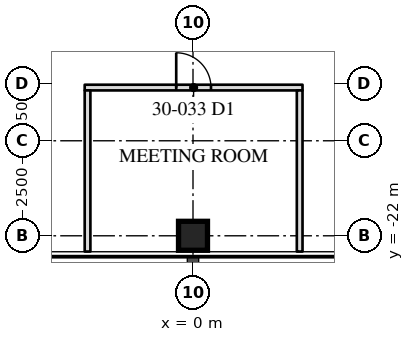
"""IFC4 building model, lengths in metres.
Left out: names, types, materials, properties, quantities, classifications, styles, units other than length and angle.
Written with IfcOpenShell. Run it as: python <this file> out.ifc"""

import sys

from ifc_helpers import new_model, si_unit, direction, frame, frame_2d, origin, origin_2d, place, context, subcontext, project, spatial, rectangle, hollow_rectangle, extrude, element, fill, save


model = new_model("IFC4")
c1 = context("Model", 3, precision=1e-05, world=origin(), true_north=direction((0.0, 1.0)))
c2 = subcontext(c1, "Body", "Model", "MODEL_VIEW")
j1 = project(units=[si_unit("LENGTHUNIT", "METRE"), si_unit("PLANEANGLEUNIT", "RADIAN")], contexts=[c1])
p1 = place(None, origin())
s1 = spatial("IfcSite", under=j1, at=p1, CompositionType="ELEMENT")
p2 = place(p1, origin())
s2 = spatial("IfcBuilding", under=s1, at=p2, CompositionType="ELEMENT")
p3 = place(p2, frame((0.0, 0.0, 129.5)))
s3 = spatial("IfcBuildingStorey", under=s2, at=p3, CompositionType="ELEMENT", Elevation=129.5)
p4 = place(p3, frame((0.0, -22.0, 0.0), z_axis=(0.0, 0.0, 1.0), x_axis=(1.0, 0.0, 0.0)))
e1 = element("IfcColumn", 1, at=p4, inside=s3, PredefinedType="COLUMN", context=c2, shape_type="SweptSolid", body=[
    extrude(hollow_rectangle(XDim=0.762, YDim=0.762, WallThickness=0.076, at=origin_2d()), origin(), (0.0, 0.0, 1.0), 4.1),
])
p5 = place(p3, frame((-2.85, -18.1, 0.0), z_axis=(0.0, 0.0, 1.0), x_axis=(1.0, 0.0, 0.0)))
e2 = element("IfcWall", 2, at=p5, inside=s3, PredefinedType="PARTITIONING", context=c2, shape_type="SweptSolid", body=[
    extrude(rectangle(XDim=5.732, YDim=0.15, at=frame_2d((2.866, 0.0))), origin(), (0.0, 0.0, 1.0), 3.91),
])
p6 = place(p5, frame((2.408, 0.0, 0.0)))
e3 = element("IfcOpeningElement", 3, at=p6, cuts=e2, PredefinedType="OPENING", context=c2, shape_type="SweptSolid", body=[
    extrude(rectangle(XDim=0.915, YDim=2.134, at=frame_2d((0.458, 1.067))), frame((0.0, 0.085, 0.0), z_axis=(0.0, -1.0, 0.0), x_axis=(1.0, 0.0, 0.0)), (0.0, 0.0, 1.0), 0.17),
])
for number, where, z_axis, x_axis in (
    (4, (-2.775, -18.175, 0.0), (0.0, 0.0, 1.0), (0.0, -1.0, 0.0)),
    (5, (2.807, -18.175, 0.0), (0.0, 0.0, 1.0), (0.0, -1.0, 0.0)),
):
    element("IfcWall", number, at=place(p3, frame(where, z_axis=z_axis, x_axis=x_axis)), inside=s3, PredefinedType="PARTITIONING", context=c2, shape_type="SweptSolid", body=[
        extrude(rectangle(XDim=4.24, YDim=0.15, at=frame_2d((2.12, 0.0))), origin(), (0.0, 0.0, 1.0), 3.91),
    ])
p7 = place(p6, origin())
e6 = element("IfcDoor", 6, at=p7, inside=s3, OperationType="SINGLE_SWING_LEFT", PredefinedType="DOOR", context=c2, shape_type="SweptSolid", body=[
    extrude(rectangle(XDim=0.915, YDim=2.134, at=frame_2d((0.458, 1.067))), frame((0.0, 0.025, 0.0), z_axis=(0.0, -1.0, 0.0), x_axis=(1.0, 0.0, 0.0)), (0.0, 0.0, 1.0), 0.05),
])
fill(e3, e6)
save(model, sys.argv[1])
